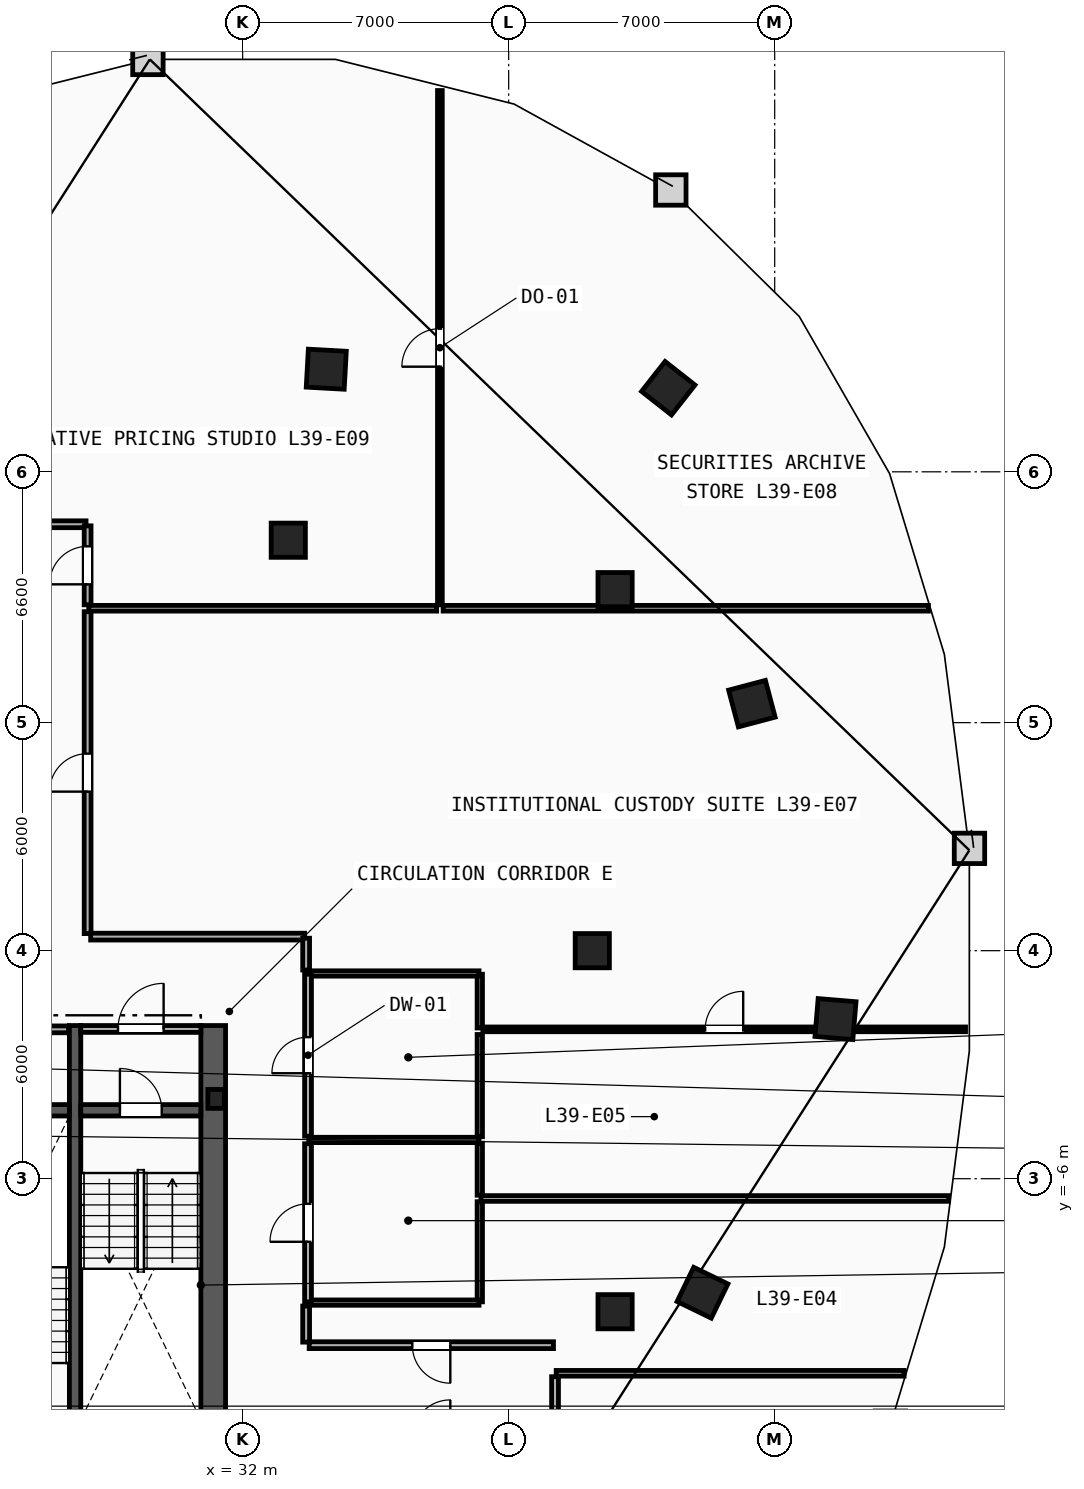
"""IFC4 building model, lengths in metres.
Left out: names, types, materials, properties, quantities, classifications, styles, units other than length and angle.
Written with IfcOpenShell. Run it as: python <this file> out.ifc"""

import sys

from ifc_helpers import new_model, si_unit, direction, frame, frame_2d, origin, origin_2d, place, context, subcontext, project, spatial, rectangle, i_section, extrude, element, fill, save


model = new_model("IFC4")
c1 = context("Model", 3, precision=1e-05, world=origin(), true_north=direction((0.0, 1.0)))
c2 = subcontext(c1, "Body", "Model", "MODEL_VIEW")
j1 = project(units=[si_unit("LENGTHUNIT", "METRE"), si_unit("PLANEANGLEUNIT", "RADIAN")], contexts=[c1])
p1 = place(None, origin())
s1 = spatial("IfcSite", under=j1, at=p1, CompositionType="ELEMENT")
p2 = place(p1, origin())
s2 = spatial("IfcBuilding", under=s1, at=p2, CompositionType="ELEMENT")
p3 = place(p2, frame((0.0, 0.0, 151.2)))
s3 = spatial("IfcBuildingStorey", under=s2, at=p3, CompositionType="ELEMENT", Elevation=151.2)
p4 = place(p3, frame((31.3, -3.9, 0.0), z_axis=(0.0, 0.0, 1.0), x_axis=(1.0, 0.0, 0.0)))
e1 = element("IfcColumn", 1, at=p4, inside=s3, PredefinedType="COLUMN", context=c2, shape_type="SweptSolid", body=[
    extrude(i_section(OverallWidth=0.432, OverallDepth=0.498, WebThickness=0.056, FlangeThickness=0.089, FilletRadius=0.018, at=origin_2d()), origin(), (0.0, 0.0, 1.0), 3.6),
])
for number, where, z_axis, x_axis in (
    (2, (41.2, 0.0, 0.0), (0.0, 0.0, 1.0), (1.0, 0.0, 0.0)),
    (3, (41.8, -9.5, 0.0), (0.0, 0.0, 1.0), (1.0, 0.0, 0.0)),
    (4, (41.8, 9.5, 0.0), (0.0, 0.0, 1.0), (1.0, 0.0, 0.0)),
    (5, (33.2, 10.8, 0.0), (0.0, 0.0, 1.0), (1.0, 0.0, 0.0)),
):
    element("IfcColumn", number, at=place(p3, frame(where, z_axis=z_axis, x_axis=x_axis)), inside=s3, PredefinedType="COLUMN", context=c2, shape_type="SweptSolid", body=[
        extrude(rectangle(XDim=0.9, YDim=0.9, at=origin_2d()), origin(), (0.0, 0.0, 1.0), 3.6),
    ])
for number, where, z_axis, x_axis in (
    (6, (44.1, -9.0, 0.0), (0.0, 0.0, 1.0), (0.437, 0.899, 0.0)),
    (7, (47.6, -1.8, 0.0), (0.0, 0.0, 1.0), (0.084, 0.997, 0.0)),
    (8, (45.4, 6.5, 0.0), (0.0, 0.0, 1.0), (-0.256, 0.967, 0.0)),
    (9, (43.2, 14.8, 0.0), (0.0, 0.0, 1.0), (-0.786, 0.618, 0.0)),
    (10, (34.2, 15.3, 0.0), (0.0, 0.0, 1.0), (-0.998, 0.055, 0.0)),
):
    element("IfcColumn", number, at=place(p3, frame(where, z_axis=z_axis, x_axis=x_axis)), inside=s3, PredefinedType="COLUMN", context=c2, shape_type="SweptSolid", body=[
        extrude(rectangle(XDim=1.0, YDim=1.0, at=origin_2d()), origin(), (0.0, 0.0, 1.0), 3.6),
    ])
p5 = place(p3, frame((31.225, -15.3, 0.0), z_axis=(0.0, 0.0, 1.0), x_axis=(0.0, 1.0, 0.0)))
e11 = element("IfcWall", 11, at=p5, inside=s3, PredefinedType="SHEAR", context=c2, shape_type="SweptSolid", body=[
    extrude(rectangle(XDim=13.33, YDim=0.65, at=frame_2d((6.665, 0.0))), origin(), (0.0, 0.0, 1.0), 3.36),
])
p6 = place(p3, frame((27.59, -12.65, 0.0), z_axis=(0.0, 0.0, 1.0), x_axis=(0.0, 1.0, 0.0)))
e12 = element("IfcWall", 12, at=p6, inside=s3, PredefinedType="SHEAR", context=c2, shape_type="SweptSolid", body=[
    extrude(rectangle(XDim=10.68, YDim=0.3, at=frame_2d((5.34, 0.0))), origin(), (0.0, 0.0, 1.0), 3.36),
])
p7 = place(p3, frame((27.74, -4.2, 0.0), z_axis=(0.0, 0.0, 1.0), x_axis=(1.0, 0.0, 0.0)))
e13 = element("IfcWall", 13, at=p7, inside=s3, PredefinedType="SHEAR", context=c2, shape_type="SweptSolid", body=[
    extrude(rectangle(XDim=3.16, YDim=0.3, at=frame_2d((1.58, 0.0))), origin(), (0.0, 0.0, 1.0), 3.36),
])
p8 = place(p7, frame((1.03, 0.0, 0.0)))
e14 = element("IfcOpeningElement", 14, at=p8, cuts=e13, PredefinedType="OPENING", context=c2, shape_type="SweptSolid", body=[
    extrude(rectangle(XDim=1.1, YDim=2.15, at=frame_2d((0.55, 1.075))), frame((0.0, 0.16, 0.0), z_axis=(0.0, -1.0, 0.0), x_axis=(1.0, 0.0, 0.0)), (0.0, 0.0, 1.0), 0.32),
])
p9 = place(p3, frame((24.28, -4.2, 0.0), z_axis=(0.0, 0.0, 1.0), x_axis=(1.0, 0.0, 0.0)))
e15 = element("IfcWall", 15, at=p9, inside=s3, PredefinedType="SHEAR", context=c2, shape_type="SweptSolid", body=[
    extrude(rectangle(XDim=3.16, YDim=0.3, at=frame_2d((1.58, 0.0))), origin(), (0.0, 0.0, 1.0), 3.36),
])
p10 = place(p3, frame((27.74, -2.06, 0.0), z_axis=(0.0, 0.0, 1.0), x_axis=(1.0, 0.0, 0.0)))
e16 = element("IfcWall", 16, at=p10, inside=s3, PredefinedType="PARTITIONING", context=c2, shape_type="SweptSolid", body=[
    extrude(rectangle(XDim=3.16, YDim=0.18, at=frame_2d((1.58, 0.0))), origin(), (0.0, 0.0, 1.0), 3.36),
])
p11 = place(p10, frame((0.98, 0.0, 0.0)))
e17 = element("IfcOpeningElement", 17, at=p11, cuts=e16, PredefinedType="OPENING", context=c2, shape_type="SweptSolid", body=[
    extrude(rectangle(XDim=1.2, YDim=2.15, at=frame_2d((0.6, 1.075))), frame((0.0, 0.1, 0.0), z_axis=(0.0, -1.0, 0.0), x_axis=(1.0, 0.0, 0.0)), (0.0, 0.0, 1.0), 0.2),
])
p12 = place(p3, frame((24.3, -2.07, 0.0), z_axis=(0.0, 0.0, 1.0), x_axis=(1.0, 0.0, 0.0)))
e18 = element("IfcWall", 18, at=p12, inside=s3, PredefinedType="PARTITIONING", context=c2, shape_type="SweptSolid", body=[
    extrude(rectangle(XDim=3.12, YDim=0.18, at=frame_2d((1.56, 0.0))), origin(), (0.0, 0.0, 1.0), 3.36),
])
p13 = place(p12, frame((1.085, 0.0, 0.0)))
e19 = element("IfcOpeningElement", 19, at=p13, cuts=e18, PredefinedType="OPENING", context=c2, shape_type="SweptSolid", body=[
    extrude(rectangle(XDim=0.95, YDim=2.1, at=frame_2d((0.475, 1.05))), frame((0.0, 0.1, 0.0), z_axis=(0.0, -1.0, 0.0), x_axis=(1.0, 0.0, 0.0)), (0.0, 0.0, 1.0), 0.2),
])
p14 = place(p3, frame((38.24, -9.24, 0.0), z_axis=(0.0, 0.0, 1.0), x_axis=(0.0, 1.0, 0.0)))
e20 = element("IfcWall", 20, at=p14, inside=s3, PredefinedType="PARTITIONING", context=c2, shape_type="SweptSolid", body=[
    extrude(rectangle(XDim=2.635, YDim=0.14, at=frame_2d((1.317, 0.0))), origin(), (0.0, 0.0, 1.0), 3.36),
])
p15 = place(p3, frame((38.24, -6.435, 0.0), z_axis=(0.0, 0.0, 1.0), x_axis=(0.0, 1.0, 0.0)))
e21 = element("IfcWall", 21, at=p15, inside=s3, PredefinedType="PARTITIONING", context=c2, shape_type="SweptSolid", body=[
    extrude(rectangle(XDim=1.37, YDim=0.14, at=frame_2d((0.685, 0.0))), origin(), (0.0, 0.0, 1.0), 3.36),
])
p16 = place(p3, frame((38.24, -4.895, 0.0), z_axis=(0.0, 0.0, 1.0), x_axis=(0.0, 1.0, 0.0)))
e22 = element("IfcWall", 22, at=p16, inside=s3, PredefinedType="PARTITIONING", context=c2, shape_type="SweptSolid", body=[
    extrude(rectangle(XDim=2.69, YDim=0.14, at=frame_2d((1.345, 0.0))), origin(), (0.0, 0.0, 1.0), 3.36),
])
p17 = place(p3, frame((38.24, -2.035, 0.0), z_axis=(0.0, 0.0, 1.0), x_axis=(0.0, 1.0, 0.0)))
e23 = element("IfcWall", 23, at=p17, inside=s3, PredefinedType="PARTITIONING", context=c2, shape_type="SweptSolid", body=[
    extrude(rectangle(XDim=1.415, YDim=0.14, at=frame_2d((0.708, 0.0))), origin(), (0.0, 0.0, 1.0), 3.36),
])
for number, where, z_axis, x_axis in (
    (24, (33.74, -0.6, 0.0), (0.0, 0.0, 1.0), (1.0, 0.0, 0.0)),
    (25, (33.74, -4.98, 0.0), (0.0, 0.0, 1.0), (1.0, 0.0, 0.0)),
    (26, (33.74, -9.26, 0.0), (0.0, 0.0, 1.0), (1.0, 0.0, 0.0)),
):
    element("IfcWall", number, at=place(p3, frame(where, z_axis=z_axis, x_axis=x_axis)), inside=s3, PredefinedType="PARTITIONING", context=c2, shape_type="SweptSolid", body=[
        extrude(rectangle(XDim=4.48, YDim=0.14, at=frame_2d((2.24, 0.0))), origin(), (0.0, 0.0, 1.0), 3.36),
    ])
p18 = place(p3, frame((33.72, -4.88, 0.0), z_axis=(0.0, 0.0, 1.0), x_axis=(0.0, 1.0, 0.0)))
e27 = element("IfcWall", 27, at=p18, inside=s3, PredefinedType="PARTITIONING", context=c2, shape_type="SweptSolid", body=[
    extrude(rectangle(XDim=4.26, YDim=0.18, at=frame_2d((2.13, 0.0))), origin(), (0.0, 0.0, 1.0), 3.36),
])
p19 = place(p18, frame((1.655, 0.0, 0.0)))
e28 = element("IfcOpeningElement", 28, at=p19, cuts=e27, PredefinedType="OPENING", context=c2, shape_type="SweptSolid", body=[
    extrude(rectangle(XDim=0.95, YDim=2.1, at=frame_2d((0.475, 1.05))), frame((0.0, 0.1, 0.0), z_axis=(0.0, -1.0, 0.0), x_axis=(1.0, 0.0, 0.0)), (0.0, 0.0, 1.0), 0.2),
])
p20 = place(p3, frame((33.72, -9.24, 0.0), z_axis=(0.0, 0.0, 1.0), x_axis=(0.0, 1.0, 0.0)))
e29 = element("IfcWall", 29, at=p20, inside=s3, PredefinedType="PARTITIONING", context=c2, shape_type="SweptSolid", body=[
    extrude(rectangle(XDim=4.16, YDim=0.18, at=frame_2d((2.08, 0.0))), origin(), (0.0, 0.0, 1.0), 3.36),
])
p21 = place(p20, frame((1.58, 0.0, 0.0)))
e30 = element("IfcOpeningElement", 30, at=p21, cuts=e29, PredefinedType="OPENING", context=c2, shape_type="SweptSolid", body=[
    extrude(rectangle(XDim=1.0, YDim=2.15, at=frame_2d((0.5, 1.075))), frame((0.0, 0.1, 0.0), z_axis=(0.0, -1.0, 0.0), x_axis=(1.0, 0.0, 0.0)), (0.0, 0.0, 1.0), 0.2),
])
p22 = place(p3, frame((27.95, 9.01, 0.0), z_axis=(0.0, 0.0, 1.0), x_axis=(1.0, 0.0, 0.0)))
e31 = element("IfcWall", 31, at=p22, inside=s3, PredefinedType="PARTITIONING", context=c2, shape_type="SweptSolid", body=[
    extrude(rectangle(XDim=9.155, YDim=0.15, at=frame_2d((4.578, 0.0))), origin(), (0.0, 0.0, 1.0), 3.36),
])
p23 = place(p3, frame((37.275, 9.01, 0.0), z_axis=(0.0, 0.0, 1.0), x_axis=(1.0, 0.0, 0.0)))
e32 = element("IfcWall", 32, at=p23, inside=s3, PredefinedType="PARTITIONING", context=c2, shape_type="SweptSolid", body=[
    extrude(rectangle(XDim=12.771, YDim=0.15, at=frame_2d((6.385, 0.0))), origin(), (0.0, 0.0, 1.0), 3.36),
])
p24 = place(p3, frame((38.27, -6.52, 0.0), z_axis=(0.0, 0.0, 1.0), x_axis=(1.0, 0.0, 0.0)))
e33 = element("IfcWall", 33, at=p24, inside=s3, PredefinedType="PARTITIONING", context=c2, shape_type="SweptSolid", body=[
    extrude(rectangle(XDim=12.307, YDim=0.15, at=frame_2d((6.154, 0.0))), origin(), (0.0, 0.0, 1.0), 3.36),
])
p25 = place(p3, frame((40.25, -11.12, 0.0), z_axis=(0.0, 0.0, 1.0), x_axis=(1.0, 0.0, 0.0)))
e34 = element("IfcWall", 34, at=p25, inside=s3, PredefinedType="PARTITIONING", context=c2, shape_type="SweptSolid", body=[
    extrude(rectangle(XDim=9.156, YDim=0.15, at=frame_2d((4.578, 0.0))), origin(), (0.0, 0.0, 1.0), 3.36),
])
p26 = place(p3, frame((40.22, -12.779, 0.0), z_axis=(0.0, 0.0, 1.0), x_axis=(0.0, 1.0, 0.0)))
e35 = element("IfcWall", 35, at=p26, inside=s3, PredefinedType="PARTITIONING", context=c2, shape_type="SweptSolid", body=[
    extrude(rectangle(XDim=1.569, YDim=0.18, at=frame_2d((0.784, 0.0))), origin(), (0.0, 0.0, 1.0), 3.36),
])
p27 = place(p3, frame((40.178, -10.38, 0.0), z_axis=(0.0, 0.0, 1.0), x_axis=(-1.0, 0.0, 0.0)))
e36 = element("IfcWall", 36, at=p27, inside=s3, PredefinedType="PARTITIONING", context=c2, shape_type="SweptSolid", body=[
    extrude(rectangle(XDim=6.428, YDim=0.18, at=frame_2d((3.214, 0.0))), origin(), (0.0, 0.0, 1.0), 3.36),
])
p28 = place(p27, frame((2.714, 0.0, 0.0)))
e37 = element("IfcOpeningElement", 37, at=p28, cuts=e36, PredefinedType="OPENING", context=c2, shape_type="SweptSolid", body=[
    extrude(rectangle(XDim=1.0, YDim=2.15, at=frame_2d((0.5, 1.075))), frame((0.0, 0.1, 0.0), z_axis=(0.0, -1.0, 0.0), x_axis=(1.0, 0.0, 0.0)), (0.0, 0.0, 1.0), 0.2),
])
p29 = place(p3, frame((33.67, -10.3, 0.0), z_axis=(0.0, 0.0, 1.0), x_axis=(0.0, 1.0, 0.0)))
e38 = element("IfcWall", 38, at=p29, inside=s3, PredefinedType="PARTITIONING", context=c2, shape_type="SweptSolid", body=[
    extrude(rectangle(XDim=0.949, YDim=0.18, at=frame_2d((0.474, 0.0))), origin(), (0.0, 0.0, 1.0), 3.36),
])
p30 = place(p3, frame((27.92, 0.45, 0.0), z_axis=(0.0, 0.0, 1.0), x_axis=(0.0, 1.0, 0.0)))
e39 = element("IfcWall", 39, at=p30, inside=s3, PredefinedType="PARTITIONING", context=c2, shape_type="SweptSolid", body=[
    extrude(rectangle(XDim=8.47, YDim=0.18, at=frame_2d((4.235, 0.0))), origin(), (0.0, 0.0, 1.0), 3.36),
])
p31 = place(p30, frame((3.735, 0.0, 0.0)))
e40 = element("IfcOpeningElement", 40, at=p31, cuts=e39, PredefinedType="OPENING", context=c2, shape_type="SweptSolid", body=[
    extrude(rectangle(XDim=1.0, YDim=2.15, at=frame_2d((0.5, 1.075))), frame((0.0, 0.1, 0.0), z_axis=(0.0, -1.0, 0.0), x_axis=(1.0, 0.0, 0.0)), (0.0, 0.0, 1.0), 0.2),
])
p32 = place(p3, frame((33.628, 0.37, 0.0), z_axis=(0.0, 0.0, 1.0), x_axis=(-1.0, 0.0, 0.0)))
e41 = element("IfcWall", 41, at=p32, inside=s3, PredefinedType="PARTITIONING", context=c2, shape_type="SweptSolid", body=[
    extrude(rectangle(XDim=5.628, YDim=0.18, at=frame_2d((2.814, 0.0))), origin(), (0.0, 0.0, 1.0), 3.36),
])
p33 = place(p3, frame((33.67, -0.509, 0.0), z_axis=(0.0, 0.0, 1.0), x_axis=(0.0, 1.0, 0.0)))
e42 = element("IfcWall", 42, at=p33, inside=s3, PredefinedType="PARTITIONING", context=c2, shape_type="SweptSolid", body=[
    extrude(rectangle(XDim=0.837, YDim=0.18, at=frame_2d((0.418, 0.0))), origin(), (0.0, 0.0, 1.0), 3.36),
])
p34 = place(p3, frame((27.878, 11.22, 0.0), z_axis=(0.0, 0.0, 1.0), x_axis=(-1.0, 0.0, 0.0)))
e43 = element("IfcWall", 43, at=p34, inside=s3, PredefinedType="PARTITIONING", context=c2, shape_type="SweptSolid", body=[
    extrude(rectangle(XDim=2.357, YDim=0.18, at=frame_2d((1.178, 0.0))), origin(), (0.0, 0.0, 1.0), 3.36),
])
p35 = place(p3, frame((27.92, 9.1, 0.0), z_axis=(0.0, 0.0, 1.0), x_axis=(0.0, 1.0, 0.0)))
e44 = element("IfcWall", 44, at=p35, inside=s3, PredefinedType="PARTITIONING", context=c2, shape_type="SweptSolid", body=[
    extrude(rectangle(XDim=2.078, YDim=0.18, at=frame_2d((1.039, 0.0))), origin(), (0.0, 0.0, 1.0), 3.36),
])
p36 = place(p35, frame((0.539, 0.0, 0.0)))
e45 = element("IfcOpeningElement", 45, at=p36, cuts=e44, PredefinedType="OPENING", context=c2, shape_type="SweptSolid", body=[
    extrude(rectangle(XDim=1.0, YDim=2.15, at=frame_2d((0.5, 1.075))), frame((0.0, 0.1, 0.0), z_axis=(0.0, -1.0, 0.0), x_axis=(1.0, 0.0, 0.0)), (0.0, 0.0, 1.0), 0.2),
])
p37 = place(p3, frame((38.32, -2.07, 0.0), z_axis=(0.0, 0.0, 1.0), x_axis=(1.0, 0.0, 0.0)))
e46 = element("IfcWall", 46, at=p37, inside=s3, PredefinedType="PARTITIONING", context=c2, shape_type="SweptSolid", body=[
    extrude(rectangle(XDim=12.702, YDim=0.125, at=frame_2d((6.351, 0.0))), origin(), (0.0, 0.0, 1.0), 3.36),
])
p38 = place(p37, frame((5.851, 0.0, 0.0)))
e47 = element("IfcOpeningElement", 47, at=p38, cuts=e46, PredefinedType="OPENING", context=c2, shape_type="SweptSolid", body=[
    extrude(rectangle(XDim=1.0, YDim=2.15, at=frame_2d((0.5, 1.075))), frame((0.0, 0.073, 0.0), z_axis=(0.0, -1.0, 0.0), x_axis=(1.0, 0.0, 0.0)), (0.0, 0.0, 1.0), 0.145),
])
p39 = place(p3, frame((37.19, 9.1, 0.0), z_axis=(0.0, 0.0, 1.0), x_axis=(0.0, 1.0, 0.0)))
e48 = element("IfcWall", 48, at=p39, inside=s3, PredefinedType="PARTITIONING", context=c2, shape_type="SweptSolid", body=[
    extrude(rectangle(XDim=13.532, YDim=0.125, at=frame_2d((6.766, 0.0))), origin(), (0.0, 0.0, 1.0), 3.36),
])
p40 = place(p39, frame((6.266, 0.0, 0.0)))
e49 = element("IfcOpeningElement", 49, at=p40, cuts=e48, PredefinedType="OPENING", context=c2, shape_type="SweptSolid", body=[
    extrude(rectangle(XDim=1.0, YDim=2.15, at=frame_2d((0.5, 1.075))), frame((0.0, 0.073, 0.0), z_axis=(0.0, -1.0, 0.0), x_axis=(1.0, 0.0, 0.0)), (0.0, 0.0, 1.0), 0.145),
])
p41 = place(p8, origin())
e50 = element("IfcDoor", 50, at=p41, inside=s3, OperationType="SINGLE_SWING_LEFT", PredefinedType="DOOR", context=c2, shape_type="SweptSolid", body=[
    extrude(rectangle(XDim=1.1, YDim=2.15, at=frame_2d((0.55, 1.075))), frame((0.0, 0.025, 0.0), z_axis=(0.0, -1.0, 0.0), x_axis=(1.0, 0.0, 0.0)), (0.0, 0.0, 1.0), 0.05),
])
fill(e14, e50)
p42 = place(p11, origin())
e51 = element("IfcDoor", 51, at=p42, inside=s3, OperationType="SINGLE_SWING_RIGHT", PredefinedType="DOOR", context=c2, shape_type="SweptSolid", body=[
    extrude(rectangle(XDim=1.2, YDim=2.15, at=frame_2d((0.6, 1.075))), frame((0.0, 0.025, 0.0), z_axis=(0.0, -1.0, 0.0), x_axis=(1.0, 0.0, 0.0)), (0.0, 0.0, 1.0), 0.05),
])
fill(e17, e51)
p43 = place(p40, origin())
e52 = element("IfcDoor", 52, at=p43, inside=s3, OperationType="SINGLE_SWING_LEFT", PredefinedType="DOOR", context=c2, shape_type="SweptSolid", body=[
    extrude(rectangle(XDim=1.0, YDim=2.15, at=frame_2d((0.5, 1.075))), frame((0.0, 0.025, 0.0), z_axis=(0.0, -1.0, 0.0), x_axis=(1.0, 0.0, 0.0)), (0.0, 0.0, 1.0), 0.05),
])
fill(e49, e52)
p44 = place(p38, origin())
e53 = element("IfcDoor", 53, at=p44, inside=s3, OperationType="SINGLE_SWING_RIGHT", PredefinedType="DOOR", context=c2, shape_type="SweptSolid", body=[
    extrude(rectangle(XDim=1.0, YDim=2.15, at=frame_2d((0.5, 1.075))), frame((0.0, 0.025, 0.0), z_axis=(0.0, -1.0, 0.0), x_axis=(1.0, 0.0, 0.0)), (0.0, 0.0, 1.0), 0.05),
])
fill(e47, e53)
p45 = place(p31, origin())
e54 = element("IfcDoor", 54, at=p45, inside=s3, OperationType="SINGLE_SWING_LEFT", PredefinedType="DOOR", context=c2, shape_type="SweptSolid", body=[
    extrude(rectangle(XDim=1.0, YDim=2.15, at=frame_2d((0.5, 1.075))), frame((0.0, 0.025, 0.0), z_axis=(0.0, -1.0, 0.0), x_axis=(1.0, 0.0, 0.0)), (0.0, 0.0, 1.0), 0.05),
])
fill(e40, e54)
p46 = place(p28, origin())
e55 = element("IfcDoor", 55, at=p46, inside=s3, OperationType="SINGLE_SWING_LEFT", PredefinedType="DOOR", context=c2, shape_type="SweptSolid", body=[
    extrude(rectangle(XDim=1.0, YDim=2.15, at=frame_2d((0.5, 1.075))), frame((0.0, 0.025, 0.0), z_axis=(0.0, -1.0, 0.0), x_axis=(1.0, 0.0, 0.0)), (0.0, 0.0, 1.0), 0.05),
])
fill(e37, e55)
p47 = place(p19, origin())
e56 = element("IfcDoor", 56, at=p47, inside=s3, OperationType="SINGLE_SWING_LEFT", PredefinedType="DOOR", context=c2, shape_type="SweptSolid", body=[
    extrude(rectangle(XDim=0.95, YDim=2.1, at=frame_2d((0.475, 1.05))), frame((0.0, 0.025, 0.0), z_axis=(0.0, -1.0, 0.0), x_axis=(1.0, 0.0, 0.0)), (0.0, 0.0, 1.0), 0.05),
])
fill(e28, e56)
p48 = place(p21, origin())
e57 = element("IfcDoor", 57, at=p48, inside=s3, OperationType="SINGLE_SWING_LEFT", PredefinedType="DOOR", context=c2, shape_type="SweptSolid", body=[
    extrude(rectangle(XDim=1.0, YDim=2.15, at=frame_2d((0.5, 1.075))), frame((0.0, 0.025, 0.0), z_axis=(0.0, -1.0, 0.0), x_axis=(1.0, 0.0, 0.0)), (0.0, 0.0, 1.0), 0.05),
])
fill(e30, e57)
p49 = place(p36, origin())
e58 = element("IfcDoor", 58, at=p49, inside=s3, OperationType="SINGLE_SWING_LEFT", PredefinedType="DOOR", context=c2, shape_type="SweptSolid", body=[
    extrude(rectangle(XDim=1.0, YDim=2.15, at=frame_2d((0.5, 1.075))), frame((0.0, 0.025, 0.0), z_axis=(0.0, -1.0, 0.0), x_axis=(1.0, 0.0, 0.0)), (0.0, 0.0, 1.0), 0.05),
])
fill(e45, e58)
save(model, sys.argv[1])
